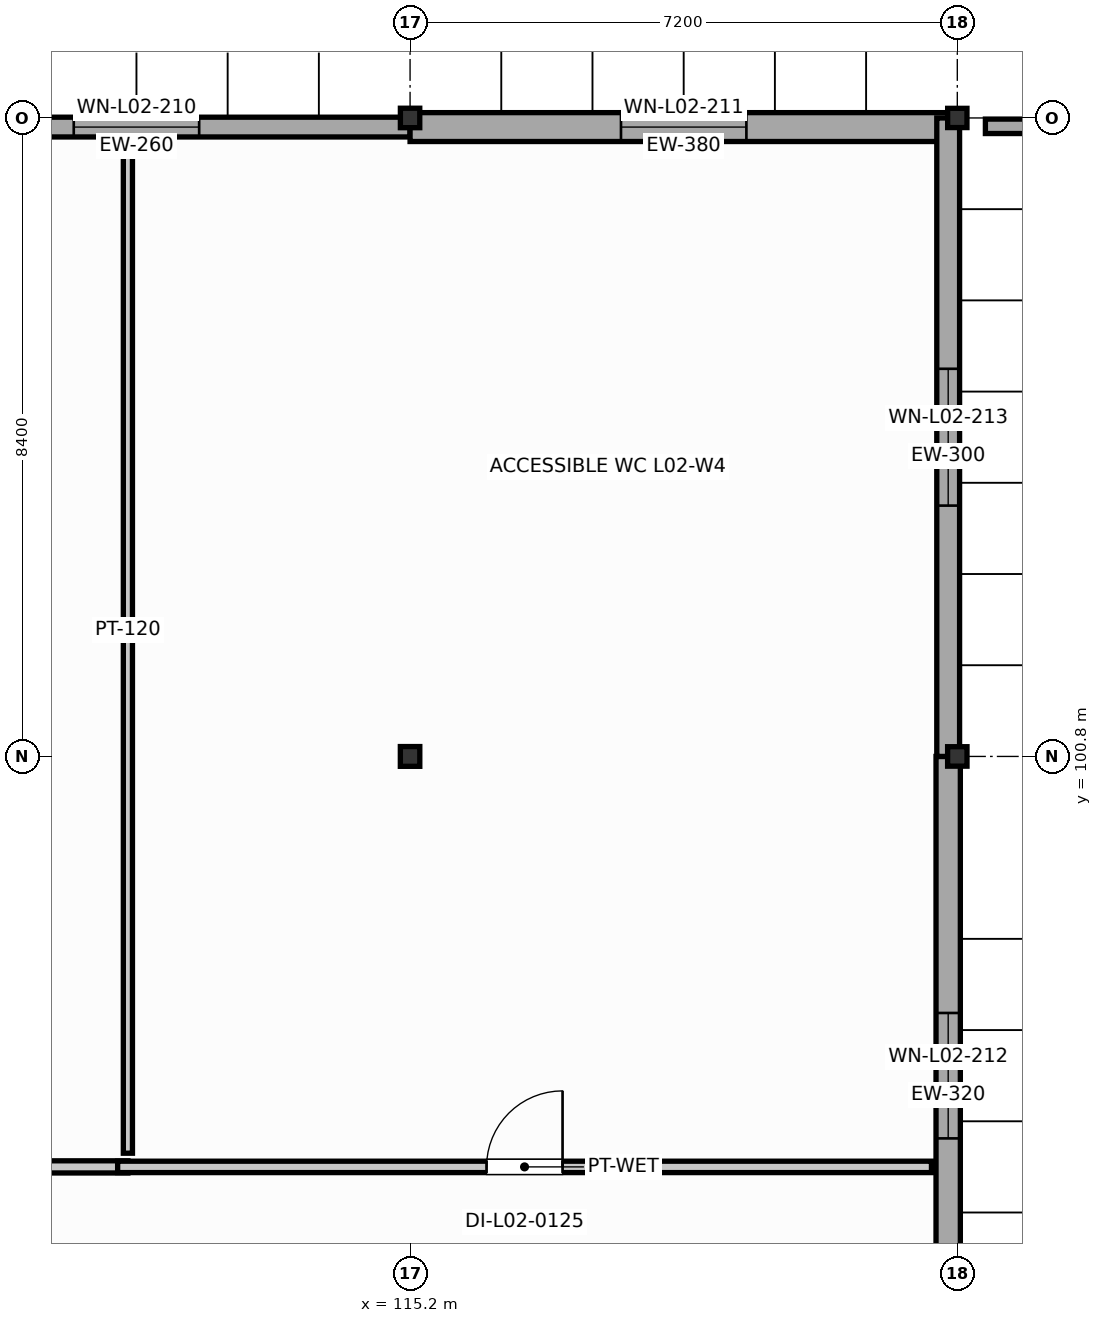
"""IFC4 building model, lengths in metres.
Left out: names, types, materials, properties, quantities, classifications, styles, units other than length and angle.
Written with IfcOpenShell. Run it as: python <this file> out.ifc"""

import sys

from ifc_helpers import new_model, si_unit, direction, frame, frame_2d, origin, origin_2d, place, context, subcontext, project, spatial, rectangle, i_section, extrude, element, fill, save


model = new_model("IFC4")
c1 = context("Model", 3, precision=1e-05, world=origin(), true_north=direction((0.0, 1.0)))
c2 = subcontext(c1, "Body", "Model", "MODEL_VIEW")
j1 = project(units=[si_unit("LENGTHUNIT", "METRE"), si_unit("PLANEANGLEUNIT", "RADIAN")], contexts=[c1])
p1 = place(None, origin())
s1 = spatial("IfcSite", under=j1, at=p1, CompositionType="ELEMENT")
p2 = place(p1, origin())
s2 = spatial("IfcBuilding", under=s1, at=p2, CompositionType="ELEMENT")
p3 = place(p2, frame((0.0, 0.0, 9.0)))
s3 = spatial("IfcBuildingStorey", under=s2, at=p3, CompositionType="ELEMENT", Elevation=9.0)
p4 = place(p3, frame((115.2, 100.8, 0.0), z_axis=(0.0, 0.0, 1.0), x_axis=(1.0, 0.0, 0.0)))
e1 = element("IfcColumn", 1, at=p4, inside=s3, PredefinedType="COLUMN", context=c2, shape_type="SweptSolid", body=[
    extrude(i_section(OverallWidth=0.256, OverallDepth=0.26, WebThickness=0.011, FlangeThickness=0.017, FilletRadius=0.013, at=origin_2d()), origin(), (0.0, 0.0, 1.0), 4.2),
])
for number, where, z_axis, x_axis in (
    (2, (115.2, 109.2, 0.0), (0.0, 0.0, 1.0), (1.0, 0.0, 0.0)),
    (3, (122.4, 100.8, 0.0), (0.0, 0.0, 1.0), (1.0, 0.0, 0.0)),
):
    element("IfcColumn", number, at=place(p3, frame(where, z_axis=z_axis, x_axis=x_axis)), inside=s3, PredefinedType="COLUMN", context=c2, shape_type="SweptSolid", body=[
        extrude(i_section(OverallWidth=0.255, OverallDepth=0.256, WebThickness=0.01, FlangeThickness=0.016, FilletRadius=0.013, at=origin_2d()), origin(), (0.0, 0.0, 1.0), 4.2),
    ])
p5 = place(p3, frame((122.4, 109.2, 0.0), z_axis=(0.0, 0.0, 1.0), x_axis=(1.0, 0.0, 0.0)))
e4 = element("IfcColumn", 4, at=p5, inside=s3, PredefinedType="COLUMN", context=c2, shape_type="SweptSolid", body=[
    extrude(i_section(OverallWidth=0.254, OverallDepth=0.253, WebThickness=0.009, FlangeThickness=0.014, FilletRadius=0.013, at=origin_2d()), origin(), (0.0, 0.0, 1.0), 4.2),
])
p6 = place(p3, frame((108.0, 109.08, 0.0), z_axis=(0.0, 0.0, 1.0), x_axis=(1.0, 0.0, 0.0)))
e5 = element("IfcWall", 5, at=p6, inside=s3, PredefinedType="SOLIDWALL", context=c2, shape_type="SweptSolid", body=[
    extrude(rectangle(XDim=7.2, YDim=0.26, at=frame_2d((3.6, 0.0))), origin(), (0.0, 0.0, 1.0), 3.482),
])
p7 = place(p6, frame((2.775, 0.0, 0.95)))
e6 = element("IfcOpeningElement", 6, at=p7, cuts=e5, PredefinedType="OPENING", context=c2, shape_type="SweptSolid", body=[
    extrude(rectangle(XDim=1.65, YDim=1.35, at=frame_2d((0.825, 0.675))), frame((0.0, 0.14, 0.0), z_axis=(0.0, -1.0, 0.0), x_axis=(1.0, 0.0, 0.0)), (0.0, 0.0, 1.0), 0.28),
])
p8 = place(p3, frame((115.2, 109.08, 0.0), z_axis=(0.0, 0.0, 1.0), x_axis=(1.0, 0.0, 0.0)))
e7 = element("IfcWall", 7, at=p8, inside=s3, PredefinedType="SOLIDWALL", context=c2, shape_type="SweptSolid", body=[
    extrude(rectangle(XDim=7.2, YDim=0.38, at=frame_2d((3.6, 0.0))), origin(), (0.0, 0.0, 1.0), 3.482),
])
p9 = place(p8, frame((2.775, 0.0, 0.95)))
e8 = element("IfcOpeningElement", 8, at=p9, cuts=e7, PredefinedType="OPENING", context=c2, shape_type="SweptSolid", body=[
    extrude(rectangle(XDim=1.65, YDim=1.55, at=frame_2d((0.825, 0.775))), frame((0.0, 0.2, 0.0), z_axis=(0.0, -1.0, 0.0), x_axis=(1.0, 0.0, 0.0)), (0.0, 0.0, 1.0), 0.4),
])
p10 = place(p3, frame((122.28, 92.4, 0.0), z_axis=(0.0, 0.0, 1.0), x_axis=(0.0, 1.0, 0.0)))
e9 = element("IfcWall", 9, at=p10, inside=s3, PredefinedType="SOLIDWALL", context=c2, shape_type="SweptSolid", body=[
    extrude(rectangle(XDim=8.4, YDim=0.32, at=frame_2d((4.2, 0.0))), origin(), (0.0, 0.0, 1.0), 3.091),
])
p11 = place(p10, frame((3.375, 0.0, 0.95)))
e10 = element("IfcOpeningElement", 10, at=p11, cuts=e9, PredefinedType="OPENING", context=c2, shape_type="SweptSolid", body=[
    extrude(rectangle(XDim=1.65, YDim=1.75, at=frame_2d((0.825, 0.875))), frame((0.0, 0.17, 0.0), z_axis=(0.0, -1.0, 0.0), x_axis=(1.0, 0.0, 0.0)), (0.0, 0.0, 1.0), 0.34),
])
p12 = place(p3, frame((122.28, 100.8, 0.0), z_axis=(0.0, 0.0, 1.0), x_axis=(0.0, 1.0, 0.0)))
e11 = element("IfcWall", 11, at=p12, inside=s3, PredefinedType="SOLIDWALL", context=c2, shape_type="SweptSolid", body=[
    extrude(rectangle(XDim=8.4, YDim=0.3, at=frame_2d((4.2, 0.0))), origin(), (0.0, 0.0, 1.0), 3.091),
])
p13 = place(p12, frame((3.3, 0.0, 0.95)))
e12 = element("IfcOpeningElement", 12, at=p13, cuts=e11, PredefinedType="OPENING", context=c2, shape_type="SweptSolid", body=[
    extrude(rectangle(XDim=1.8, YDim=1.15, at=frame_2d((0.9, 0.575))), frame((0.0, 0.16, 0.0), z_axis=(0.0, -1.0, 0.0), x_axis=(1.0, 0.0, 0.0)), (0.0, 0.0, 1.0), 0.32),
])
p14 = place(p3, frame((122.77, 109.09, 0.0), z_axis=(0.0, 0.0, 1.0), x_axis=(1.0, 0.0, 0.0)))
e13 = element("IfcWall", 13, at=p14, inside=s3, PredefinedType="PARAPET", context=c2, shape_type="SweptSolid", body=[
    extrude(rectangle(XDim=13.753, YDim=0.19, at=frame_2d((6.877, 0.0))), origin(), (0.0, 0.0, 1.0), 1.15),
])
p15 = place(p3, frame((111.488, 95.4, 0.0), z_axis=(0.0, 0.0, 1.0), x_axis=(-1.0, 0.0, 0.0)))
e14 = element("IfcWall", 14, at=p15, inside=s3, PredefinedType="PARTITIONING", context=c2, shape_type="SweptSolid", body=[
    extrude(rectangle(XDim=10.897, YDim=0.16, at=frame_2d((5.449, 0.0))), origin(), (0.0, 0.0, 1.0), 3.252),
])
p16 = place(p15, frame((4.729, 0.0, 0.0)))
e15 = element("IfcOpeningElement", 15, at=p16, cuts=e14, PredefinedType="OPENING", context=c2, shape_type="SweptSolid", body=[
    extrude(rectangle(XDim=1.3, YDim=2.15, at=frame_2d((0.65, 1.075))), frame((0.0, 0.09, 0.0), z_axis=(0.0, -1.0, 0.0), x_axis=(1.0, 0.0, 0.0)), (0.0, 0.0, 1.0), 0.18),
])
p17 = place(p3, frame((111.488, 108.86, 0.0), z_axis=(0.0, 0.0, 1.0), x_axis=(0.0, -1.0, 0.0)))
e16 = element("IfcWall", 16, at=p17, inside=s3, PredefinedType="PARTITIONING", context=c2, shape_type="SweptSolid", body=[
    extrude(rectangle(XDim=13.28, YDim=0.12, at=frame_2d((6.64, 0.0))), origin(), (0.0, 0.0, 1.0), 3.257),
])
p18 = place(p3, frame((122.06, 95.4, 0.0), z_axis=(0.0, 0.0, 1.0), x_axis=(-1.0, 0.0, 0.0)))
e17 = element("IfcWall", 17, at=p18, inside=s3, PredefinedType="PLUMBINGWALL", context=c2, shape_type="SweptSolid", body=[
    extrude(rectangle(XDim=10.708, YDim=0.15, at=frame_2d((5.354, 0.0))), origin(), (0.0, 0.0, 1.0), 3.479),
])
p19 = place(p18, frame((4.854, 0.0, 0.0)))
e18 = element("IfcOpeningElement", 18, at=p19, cuts=e17, PredefinedType="OPENING", context=c2, shape_type="SweptSolid", body=[
    extrude(rectangle(XDim=1.0, YDim=2.1, at=frame_2d((0.5, 1.05))), frame((0.0, 0.085, 0.0), z_axis=(0.0, -1.0, 0.0), x_axis=(1.0, 0.0, 0.0)), (0.0, 0.0, 1.0), 0.17),
])
p20 = place(p7, origin())
e19 = element("IfcWindow", 19, at=p20, inside=s3, PartitioningType="SINGLE_PANEL", PredefinedType="WINDOW", context=c2, shape_type="SweptSolid", body=[
    extrude(rectangle(XDim=1.65, YDim=1.35, at=frame_2d((0.825, 0.675))), frame((0.0, 0.03, 0.0), z_axis=(0.0, -1.0, 0.0), x_axis=(1.0, 0.0, 0.0)), (0.0, 0.0, 1.0), 0.06),
])
fill(e6, e19)
p21 = place(p9, origin())
e20 = element("IfcWindow", 20, at=p21, inside=s3, PartitioningType="SINGLE_PANEL", PredefinedType="WINDOW", context=c2, shape_type="SweptSolid", body=[
    extrude(rectangle(XDim=1.65, YDim=1.55, at=frame_2d((0.825, 0.775))), frame((0.0, 0.03, 0.0), z_axis=(0.0, -1.0, 0.0), x_axis=(1.0, 0.0, 0.0)), (0.0, 0.0, 1.0), 0.06),
])
fill(e8, e20)
p22 = place(p11, origin())
e21 = element("IfcWindow", 21, at=p22, inside=s3, PartitioningType="SINGLE_PANEL", PredefinedType="WINDOW", context=c2, shape_type="SweptSolid", body=[
    extrude(rectangle(XDim=1.65, YDim=1.75, at=frame_2d((0.825, 0.875))), frame((0.0, 0.03, 0.0), z_axis=(0.0, -1.0, 0.0), x_axis=(1.0, 0.0, 0.0)), (0.0, 0.0, 1.0), 0.06),
])
fill(e10, e21)
p23 = place(p13, origin())
e22 = element("IfcWindow", 22, at=p23, inside=s3, PartitioningType="SINGLE_PANEL", PredefinedType="WINDOW", context=c2, shape_type="SweptSolid", body=[
    extrude(rectangle(XDim=1.8, YDim=1.15, at=frame_2d((0.9, 0.575))), frame((0.0, 0.03, 0.0), z_axis=(0.0, -1.0, 0.0), x_axis=(1.0, 0.0, 0.0)), (0.0, 0.0, 1.0), 0.06),
])
fill(e12, e22)
p24 = place(p19, frame((1.0, 0.0, 0.0), z_axis=(0.0, 0.0, 1.0), x_axis=(-1.0, 0.0, 0.0)))
e23 = element("IfcDoor", 23, at=p24, inside=s3, OperationType="SINGLE_SWING_RIGHT", PredefinedType="DOOR", context=c2, shape_type="SweptSolid", body=[
    extrude(rectangle(XDim=1.0, YDim=2.1, at=frame_2d((0.5, 1.05))), frame((0.0, 0.025, 0.0), z_axis=(0.0, -1.0, 0.0), x_axis=(1.0, 0.0, 0.0)), (0.0, 0.0, 1.0), 0.05),
])
fill(e18, e23)
save(model, sys.argv[1])
